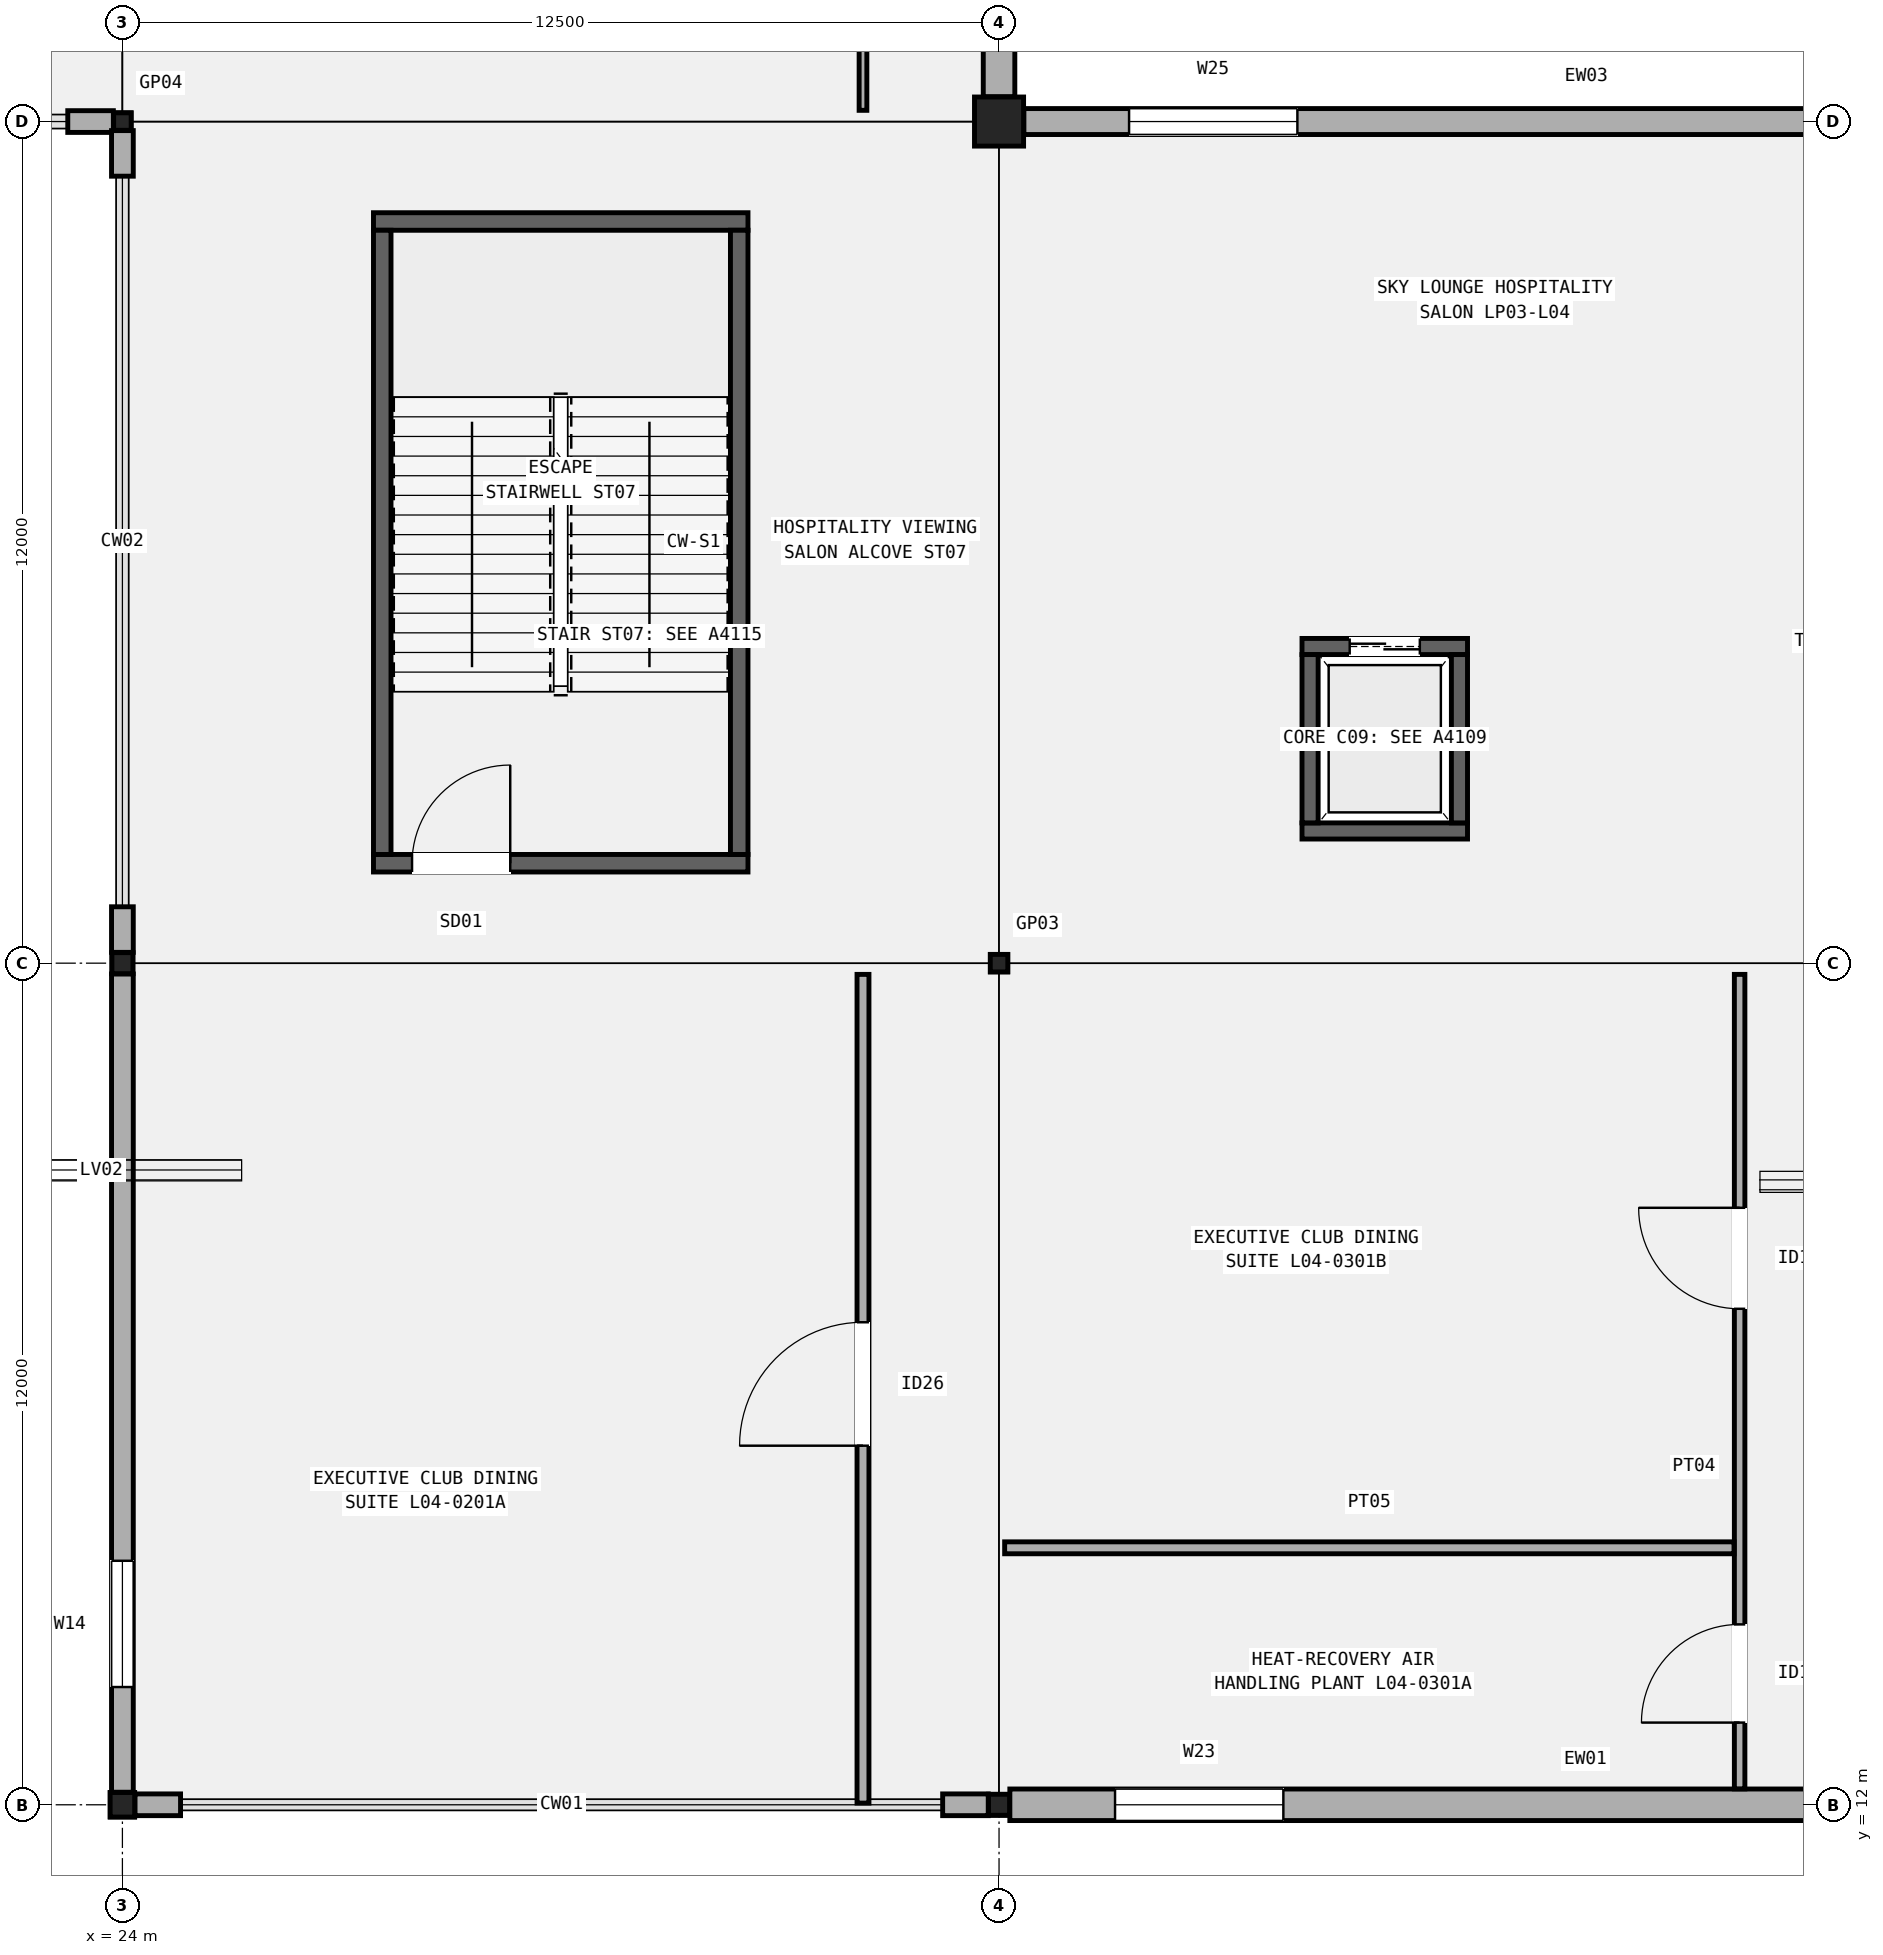
"""IFC4 building model, lengths in metres.
Left out: names, types, materials, properties, quantities, classifications, styles, units other than length and angle.
Written with IfcOpenShell. Run it as: python <this file> out.ifc"""

import sys

from ifc_helpers import new_model, si_unit, direction, frame, frame_2d, origin, origin_2d, place, context, subcontext, project, spatial, rectangle, hollow_rectangle, extrude, element, fill, save


model = new_model("IFC4")
c1 = context("Model", 3, precision=1e-05, world=origin(), true_north=direction((0.0, 1.0)))
c2 = subcontext(c1, "Body", "Model", "MODEL_VIEW")
j1 = project(units=[si_unit("LENGTHUNIT", "METRE"), si_unit("PLANEANGLEUNIT", "RADIAN")], contexts=[c1])
p1 = place(None, origin())
s1 = spatial("IfcSite", under=j1, at=p1, CompositionType="ELEMENT")
p2 = place(p1, origin())
s2 = spatial("IfcBuilding", under=s1, at=p2, CompositionType="ELEMENT")
p3 = place(p2, frame((0.0, 0.0, 20.4)))
s3 = spatial("IfcBuildingStorey", under=s2, at=p3, CompositionType="ELEMENT", Elevation=20.4)
p4 = place(p3, frame((24.0, 12.0, 0.0), z_axis=(0.0, 0.0, 1.0), x_axis=(1.0, 0.0, 0.0)))
e1 = element("IfcColumn", 1, at=p4, inside=s3, PredefinedType="COLUMN", context=c2, shape_type="SweptSolid", body=[
    extrude(hollow_rectangle(XDim=0.35, YDim=0.35, WallThickness=0.016, InnerFilletRadius=0.016, OuterFilletRadius=0.032, at=origin_2d()), origin(), (0.0, 0.0, 1.0), 5.4),
])
p5 = place(p3, frame((24.0, 24.0, 0.0), z_axis=(0.0, 0.0, 1.0), x_axis=(1.0, 0.0, 0.0)))
e2 = element("IfcColumn", 2, at=p5, inside=s3, PredefinedType="COLUMN", context=c2, shape_type="SweptSolid", body=[
    extrude(hollow_rectangle(XDim=0.3, YDim=0.3, WallThickness=0.012, InnerFilletRadius=0.012, OuterFilletRadius=0.024, at=origin_2d()), origin(), (0.0, 0.0, 1.0), 5.4),
])
p6 = place(p3, frame((24.0, 36.0, 0.0), z_axis=(0.0, 0.0, 1.0), x_axis=(1.0, 0.0, 0.0)))
e3 = element("IfcColumn", 3, at=p6, inside=s3, PredefinedType="COLUMN", context=c2, shape_type="SweptSolid", body=[
    extrude(hollow_rectangle(XDim=0.25, YDim=0.25, WallThickness=0.012, InnerFilletRadius=0.012, OuterFilletRadius=0.024, at=origin_2d()), origin(), (0.0, 0.0, 1.0), 5.4),
])
p7 = place(p3, frame((36.5, 12.0, 0.0), z_axis=(0.0, 0.0, 1.0), x_axis=(1.0, 0.0, 0.0)))
e4 = element("IfcColumn", 4, at=p7, inside=s3, PredefinedType="COLUMN", context=c2, shape_type="SweptSolid", body=[
    extrude(hollow_rectangle(XDim=0.3, YDim=0.3, WallThickness=0.012, InnerFilletRadius=0.012, OuterFilletRadius=0.024, at=origin_2d()), origin(), (0.0, 0.0, 1.0), 5.4),
])
p8 = place(p3, frame((36.5, 24.0, 0.0), z_axis=(0.0, 0.0, 1.0), x_axis=(1.0, 0.0, 0.0)))
e5 = element("IfcColumn", 5, at=p8, inside=s3, PredefinedType="COLUMN", context=c2, shape_type="SweptSolid", body=[
    extrude(hollow_rectangle(XDim=0.25, YDim=0.25, WallThickness=0.012, InnerFilletRadius=0.012, OuterFilletRadius=0.024, at=origin_2d()), origin(), (0.0, 0.0, 1.0), 5.4),
])
p9 = place(p3, frame((36.5, 36.0, 0.0), z_axis=(0.0, 0.0, 1.0), x_axis=(1.0, 0.0, 0.0)))
e6 = element("IfcColumn", 6, at=p9, inside=s3, PredefinedType="COLUMN", context=c2, shape_type="SweptSolid", body=[
    extrude(rectangle(XDim=0.7, YDim=0.7, at=origin_2d()), origin(), (0.0, 0.0, 1.0), 5.4),
])
p10 = place(p3, frame((23.221, 36.0, 0.0), z_axis=(0.0, 0.0, 1.0), x_axis=(1.0, 0.0, 0.0)))
e7 = element("IfcWall", 7, at=p10, inside=s3, PredefinedType="SOLIDWALL", context=c2, shape_type="SweptSolid", body=[
    extrude(rectangle(XDim=0.65, YDim=0.31, at=frame_2d((0.325, 0.0))), origin(), (0.0, 0.0, 1.0), 4.58),
])
p11 = place(p3, frame((24.179, 12.0, 0.0), z_axis=(0.0, 0.0, 1.0), x_axis=(1.0, 0.0, 0.0)))
e8 = element("IfcWall", 8, at=p11, inside=s3, PredefinedType="SOLIDWALL", context=c2, shape_type="SweptSolid", body=[
    extrude(rectangle(XDim=0.65, YDim=0.31, at=frame_2d((0.325, 0.0))), origin(), (0.0, 0.0, 1.0), 4.48),
])
p12 = place(p3, frame((35.696, 12.0, 0.0), z_axis=(0.0, 0.0, 1.0), x_axis=(1.0, 0.0, 0.0)))
e9 = element("IfcWall", 9, at=p12, inside=s3, PredefinedType="SOLIDWALL", context=c2, shape_type="SweptSolid", body=[
    extrude(rectangle(XDim=0.65, YDim=0.31, at=frame_2d((0.325, 0.0))), origin(), (0.0, 0.0, 1.0), 4.48),
])
p13 = place(p3, frame((24.0, 12.179, 0.0), z_axis=(0.0, 0.0, 1.0), x_axis=(0.0, 1.0, 0.0)))
e10 = element("IfcWall", 10, at=p13, inside=s3, PredefinedType="SOLIDWALL", context=c2, shape_type="SweptSolid", body=[
    extrude(rectangle(XDim=11.667, YDim=0.31, at=frame_2d((5.833, 0.0))), origin(), (0.0, 0.0, 1.0), 4.48),
])
p14 = place(p13, frame((1.5, 0.0, 0.95)))
e11 = element("IfcOpeningElement", 11, at=p14, cuts=e10, PredefinedType="OPENING", context=c2, shape_type="SweptSolid", body=[
    extrude(rectangle(XDim=1.8, YDim=2.15, at=frame_2d((0.9, 1.075))), frame((0.0, 0.165, 0.0), z_axis=(0.0, -1.0, 0.0), x_axis=(1.0, 0.0, 0.0)), (0.0, 0.0, 1.0), 0.33),
])
p15 = place(p3, frame((24.0, 24.154, 0.0), z_axis=(0.0, 0.0, 1.0), x_axis=(0.0, 1.0, 0.0)))
e12 = element("IfcWall", 12, at=p15, inside=s3, PredefinedType="SOLIDWALL", context=c2, shape_type="SweptSolid", body=[
    extrude(rectangle(XDim=0.65, YDim=0.31, at=frame_2d((0.325, 0.0))), origin(), (0.0, 0.0, 1.0), 4.58),
])
p16 = place(p3, frame((24.0, 35.221, 0.0), z_axis=(0.0, 0.0, 1.0), x_axis=(0.0, 1.0, 0.0)))
e13 = element("IfcWall", 13, at=p16, inside=s3, PredefinedType="SOLIDWALL", context=c2, shape_type="SweptSolid", body=[
    extrude(rectangle(XDim=0.65, YDim=0.31, at=frame_2d((0.325, 0.0))), origin(), (0.0, 0.0, 1.0), 4.58),
])
p17 = place(p3, frame((36.5, 36.354, 0.0), z_axis=(0.0, 0.0, 1.0), x_axis=(0.0, 1.0, 0.0)))
e14 = element("IfcWall", 14, at=p17, inside=s3, PredefinedType="SOLIDWALL", context=c2, shape_type="SweptSolid", body=[
    extrude(rectangle(XDim=11.342, YDim=0.45, at=frame_2d((5.671, 0.0))), origin(), (0.0, 0.0, 1.0), 4.48),
])
p18 = place(p17, frame((1.5, 0.0, 0.95)))
e15 = element("IfcOpeningElement", 15, at=p18, cuts=e14, PredefinedType="OPENING", context=c2, shape_type="SweptSolid", body=[
    extrude(rectangle(XDim=1.8, YDim=2.55, at=frame_2d((0.9, 1.275))), frame((0.0, 0.235, 0.0), z_axis=(0.0, -1.0, 0.0), x_axis=(1.0, 0.0, 0.0)), (0.0, 0.0, 1.0), 0.47),
])
p19 = place(p3, frame((36.654, 12.0, 0.0), z_axis=(0.0, 0.0, 1.0), x_axis=(1.0, 0.0, 0.0)))
e16 = element("IfcWall", 16, at=p19, inside=s3, PredefinedType="SOLIDWALL", context=c2, shape_type="SweptSolid", body=[
    extrude(rectangle(XDim=12.217, YDim=0.45, at=frame_2d((6.108, 0.0))), origin(), (0.0, 0.0, 1.0), 4.58),
])
p20 = place(p19, frame((1.5, 0.0, 0.95)))
e17 = element("IfcOpeningElement", 17, at=p20, cuts=e16, PredefinedType="OPENING", context=c2, shape_type="SweptSolid", body=[
    extrude(rectangle(XDim=2.4, YDim=1.65, at=frame_2d((1.2, 0.825))), frame((0.0, 0.235, 0.0), z_axis=(0.0, -1.0, 0.0), x_axis=(1.0, 0.0, 0.0)), (0.0, 0.0, 1.0), 0.47),
])
p21 = place(p3, frame((36.854, 36.0, 0.0), z_axis=(0.0, 0.0, 1.0), x_axis=(1.0, 0.0, 0.0)))
e18 = element("IfcWall", 18, at=p21, inside=s3, PredefinedType="SOLIDWALL", context=c2, shape_type="SweptSolid", body=[
    extrude(rectangle(XDim=11.842, YDim=0.37, at=frame_2d((5.921, 0.0))), origin(), (0.0, 0.0, 1.0), 4.48),
])
p22 = place(p21, frame((1.5, 0.0, 0.95)))
e19 = element("IfcOpeningElement", 19, at=p22, cuts=e18, PredefinedType="OPENING", context=c2, shape_type="SweptSolid", body=[
    extrude(rectangle(XDim=2.4, YDim=2.45, at=frame_2d((1.2, 1.225))), frame((0.0, 0.195, 0.0), z_axis=(0.0, -1.0, 0.0), x_axis=(1.0, 0.0, 0.0)), (0.0, 0.0, 1.0), 0.39),
])
p23 = place(p3, frame((27.58, 25.425, 0.0), z_axis=(0.0, 0.0, 1.0), x_axis=(1.0, 0.0, 0.0)))
e20 = element("IfcWall", 20, at=p23, inside=s3, PredefinedType="SHEAR", context=c2, shape_type="SweptSolid", body=[
    extrude(rectangle(XDim=5.34, YDim=0.25, at=frame_2d((2.67, 0.0))), origin(), (0.0, 0.0, 1.0), 5.18),
])
p24 = place(p23, frame((0.55, 0.0, 0.0)))
e21 = element("IfcOpeningElement", 21, at=p24, cuts=e20, PredefinedType="OPENING", context=c2, shape_type="SweptSolid", body=[
    extrude(rectangle(XDim=1.4, YDim=2.15, at=frame_2d((0.7, 1.075))), frame((0.0, 0.135, 0.0), z_axis=(0.0, -1.0, 0.0), x_axis=(1.0, 0.0, 0.0)), (0.0, 0.0, 1.0), 0.27),
])
p25 = place(p3, frame((27.58, 34.575, 0.0), z_axis=(0.0, 0.0, 1.0), x_axis=(1.0, 0.0, 0.0)))
e22 = element("IfcWall", 22, at=p25, inside=s3, PredefinedType="SHEAR", context=c2, shape_type="SweptSolid", body=[
    extrude(rectangle(XDim=5.34, YDim=0.25, at=frame_2d((2.67, 0.0))), origin(), (0.0, 0.0, 1.0), 5.18),
])
for number, where, z_axis, x_axis in (
    (23, (27.705, 25.55, 0.0), (0.0, 0.0, 1.0), (0.0, 1.0, 0.0)),
    (24, (32.795, 25.55, 0.0), (0.0, 0.0, 1.0), (0.0, 1.0, 0.0)),
):
    element("IfcWall", number, at=place(p3, frame(where, z_axis=z_axis, x_axis=x_axis)), inside=s3, PredefinedType="SHEAR", context=c2, shape_type="SweptSolid", body=[
        extrude(rectangle(XDim=8.9, YDim=0.25, at=frame_2d((4.45, 0.0))), origin(), (0.0, 0.0, 1.0), 5.18),
    ])
p26 = place(p3, frame((40.82, 25.885, 0.0), z_axis=(0.0, 0.0, 1.0), x_axis=(1.0, 0.0, 0.0)))
e25 = element("IfcWall", 25, at=p26, inside=s3, PredefinedType="SHEAR", context=c2, shape_type="SweptSolid", body=[
    extrude(rectangle(XDim=2.36, YDim=0.23, at=frame_2d((1.18, 0.0))), origin(), (0.0, 0.0, 1.0), 5.18),
])
p27 = place(p3, frame((40.82, 28.515, 0.0), z_axis=(0.0, 0.0, 1.0), x_axis=(1.0, 0.0, 0.0)))
e26 = element("IfcWall", 26, at=p27, inside=s3, PredefinedType="SHEAR", context=c2, shape_type="SweptSolid", body=[
    extrude(rectangle(XDim=2.36, YDim=0.23, at=frame_2d((1.18, 0.0))), origin(), (0.0, 0.0, 1.0), 5.18),
])
p28 = place(p27, frame((0.68, 0.0, 0.0)))
e27 = element("IfcOpeningElement", 27, at=p28, cuts=e26, PredefinedType="OPENING", context=c2, shape_type="SweptSolid", body=[
    extrude(rectangle(XDim=1.0, YDim=2.15, at=frame_2d((0.5, 1.075))), frame((0.0, 0.125, 0.0), z_axis=(0.0, -1.0, 0.0), x_axis=(1.0, 0.0, 0.0)), (0.0, 0.0, 1.0), 0.25),
])
for number, where, z_axis, x_axis in (
    (28, (40.935, 26.0, 0.0), (0.0, 0.0, 1.0), (0.0, 1.0, 0.0)),
    (29, (43.065, 26.0, 0.0), (0.0, 0.0, 1.0), (0.0, 1.0, 0.0)),
):
    element("IfcWall", number, at=place(p3, frame(where, z_axis=z_axis, x_axis=x_axis)), inside=s3, PredefinedType="SHEAR", context=c2, shape_type="SweptSolid", body=[
        extrude(rectangle(XDim=2.4, YDim=0.23, at=frame_2d((1.2, 0.0))), origin(), (0.0, 0.0, 1.0), 5.18),
    ])
p29 = place(p3, frame((34.56, 12.024, 0.0), z_axis=(0.0, 0.0, 1.0), x_axis=(0.0, 1.0, 0.0)))
e30 = element("IfcWall", 30, at=p29, inside=s3, PredefinedType="PARTITIONING", context=c2, shape_type="SweptSolid", body=[
    extrude(rectangle(XDim=11.816, YDim=0.17, at=frame_2d((5.908, 0.0))), origin(), (0.0, 0.0, 1.0), 4.52),
])
p30 = place(p29, frame((5.096, 0.0, 0.0)))
e31 = element("IfcOpeningElement", 31, at=p30, cuts=e30, PredefinedType="OPENING", context=c2, shape_type="SweptSolid", body=[
    extrude(rectangle(XDim=1.76, YDim=2.3, at=frame_2d((0.88, 1.15))), frame((0.0, 0.095, 0.0), z_axis=(0.0, -1.0, 0.0), x_axis=(1.0, 0.0, 0.0)), (0.0, 0.0, 1.0), 0.19),
])
p31 = place(p3, frame((34.56, 36.16, 0.0), z_axis=(0.0, 0.0, 1.0), x_axis=(0.0, 1.0, 0.0)))
e32 = element("IfcWall", 32, at=p31, inside=s3, PredefinedType="PARTITIONING", context=c2, shape_type="SweptSolid", body=[
    extrude(rectangle(XDim=11.68, YDim=0.11, at=frame_2d((5.84, 0.0))), origin(), (0.0, 0.0, 1.0), 4.52),
])
p32 = place(p31, frame((2.488, 0.0, 0.0)))
e33 = element("IfcOpeningElement", 33, at=p32, cuts=e32, PredefinedType="OPENING", context=c2, shape_type="SweptSolid", body=[
    extrude(rectangle(XDim=0.9, YDim=2.06, at=frame_2d((0.45, 1.03))), frame((0.0, 0.065, 0.0), z_axis=(0.0, -1.0, 0.0), x_axis=(1.0, 0.0, 0.0)), (0.0, 0.0, 1.0), 0.13),
])
p33 = place(p31, frame((8.398, 0.0, 0.0)))
e34 = element("IfcOpeningElement", 34, at=p33, cuts=e32, PredefinedType="OPENING", context=c2, shape_type="SweptSolid", body=[
    extrude(rectangle(XDim=0.92, YDim=2.1, at=frame_2d((0.46, 1.05))), frame((0.0, 0.065, 0.0), z_axis=(0.0, -1.0, 0.0), x_axis=(1.0, 0.0, 0.0)), (0.0, 0.0, 1.0), 0.13),
])
p34 = place(p3, frame((47.06, 12.227, 0.0), z_axis=(0.0, 0.0, 1.0), x_axis=(0.0, 1.0, 0.0)))
e35 = element("IfcWall", 35, at=p34, inside=s3, PredefinedType="PARTITIONING", context=c2, shape_type="SweptSolid", body=[
    extrude(rectangle(XDim=11.613, YDim=0.15, at=frame_2d((5.807, 0.0))), origin(), (0.0, 0.0, 1.0), 4.52),
])
p35 = place(p34, frame((0.945, 0.0, 0.0)))
e36 = element("IfcOpeningElement", 36, at=p35, cuts=e35, PredefinedType="OPENING", context=c2, shape_type="SweptSolid", body=[
    extrude(rectangle(XDim=1.4, YDim=2.24, at=frame_2d((0.7, 1.12))), frame((0.0, 0.085, 0.0), z_axis=(0.0, -1.0, 0.0), x_axis=(1.0, 0.0, 0.0)), (0.0, 0.0, 1.0), 0.17),
])
p36 = place(p34, frame((6.845, 0.0, 0.0)))
e37 = element("IfcOpeningElement", 37, at=p36, cuts=e35, PredefinedType="OPENING", context=c2, shape_type="SweptSolid", body=[
    extrude(rectangle(XDim=1.44, YDim=2.26, at=frame_2d((0.72, 1.13))), frame((0.0, 0.085, 0.0), z_axis=(0.0, -1.0, 0.0), x_axis=(1.0, 0.0, 0.0)), (0.0, 0.0, 1.0), 0.17),
])
p37 = place(p3, frame((36.58, 15.664, 0.0), z_axis=(0.0, 0.0, 1.0), x_axis=(1.0, 0.0, 0.0)))
e38 = element("IfcWall", 38, at=p37, inside=s3, PredefinedType="PARTITIONING", context=c2, shape_type="SweptSolid", body=[
    extrude(rectangle(XDim=10.4, YDim=0.17, at=frame_2d((5.2, 0.0))), origin(), (0.0, 0.0, 1.0), 4.52),
])
p38 = place(p14, origin())
e39 = element("IfcWindow", 39, at=p38, inside=s3, PartitioningType="SINGLE_PANEL", PredefinedType="WINDOW", context=c2, shape_type="SweptSolid", body=[
    extrude(rectangle(XDim=1.8, YDim=2.15, at=frame_2d((0.9, 1.075))), frame((0.0, 0.03, 0.0), z_axis=(0.0, -1.0, 0.0), x_axis=(1.0, 0.0, 0.0)), (0.0, 0.0, 1.0), 0.06),
])
fill(e11, e39)
p39 = place(p20, origin())
e40 = element("IfcWindow", 40, at=p39, inside=s3, PartitioningType="SINGLE_PANEL", PredefinedType="WINDOW", context=c2, shape_type="SweptSolid", body=[
    extrude(rectangle(XDim=2.4, YDim=1.65, at=frame_2d((1.2, 0.825))), frame((0.0, 0.03, 0.0), z_axis=(0.0, -1.0, 0.0), x_axis=(1.0, 0.0, 0.0)), (0.0, 0.0, 1.0), 0.06),
])
fill(e17, e40)
p40 = place(p22, origin())
e41 = element("IfcWindow", 41, at=p40, inside=s3, PartitioningType="SINGLE_PANEL", PredefinedType="WINDOW", context=c2, shape_type="SweptSolid", body=[
    extrude(rectangle(XDim=2.4, YDim=2.45, at=frame_2d((1.2, 1.225))), frame((0.0, 0.03, 0.0), z_axis=(0.0, -1.0, 0.0), x_axis=(1.0, 0.0, 0.0)), (0.0, 0.0, 1.0), 0.06),
])
fill(e19, e41)
p41 = place(p24, origin())
e42 = element("IfcDoor", 42, at=p41, inside=s3, OperationType="SINGLE_SWING_RIGHT", PredefinedType="DOOR", context=c2, shape_type="SweptSolid", body=[
    extrude(rectangle(XDim=1.4, YDim=2.15, at=frame_2d((0.7, 1.075))), frame((0.0, 0.025, 0.0), z_axis=(0.0, -1.0, 0.0), x_axis=(1.0, 0.0, 0.0)), (0.0, 0.0, 1.0), 0.05),
])
fill(e21, e42)
p42 = place(p28, origin())
e43 = element("IfcDoor", 43, at=p42, inside=s3, OperationType="DOUBLE_DOOR_SLIDING", PredefinedType="DOOR", context=c2, shape_type="SweptSolid", body=[
    extrude(rectangle(XDim=1.0, YDim=2.15, at=frame_2d((0.5, 1.075))), frame((0.0, 0.025, 0.0), z_axis=(0.0, -1.0, 0.0), x_axis=(1.0, 0.0, 0.0)), (0.0, 0.0, 1.0), 0.05),
])
fill(e27, e43)
p43 = place(p30, origin())
e44 = element("IfcDoor", 44, at=p43, inside=s3, OperationType="SINGLE_SWING_LEFT", PredefinedType="DOOR", context=c2, shape_type="SweptSolid", body=[
    extrude(rectangle(XDim=1.76, YDim=2.3, at=frame_2d((0.88, 1.15))), frame((0.0, 0.025, 0.0), z_axis=(0.0, -1.0, 0.0), x_axis=(1.0, 0.0, 0.0)), (0.0, 0.0, 1.0), 0.05),
])
fill(e31, e44)
p44 = place(p35, origin())
e45 = element("IfcDoor", 45, at=p44, inside=s3, OperationType="SINGLE_SWING_LEFT", PredefinedType="DOOR", context=c2, shape_type="SweptSolid", body=[
    extrude(rectangle(XDim=1.4, YDim=2.24, at=frame_2d((0.7, 1.12))), frame((0.0, 0.025, 0.0), z_axis=(0.0, -1.0, 0.0), x_axis=(1.0, 0.0, 0.0)), (0.0, 0.0, 1.0), 0.05),
])
fill(e36, e45)
p45 = place(p36, origin())
e46 = element("IfcDoor", 46, at=p45, inside=s3, OperationType="SINGLE_SWING_RIGHT", PredefinedType="DOOR", context=c2, shape_type="SweptSolid", body=[
    extrude(rectangle(XDim=1.44, YDim=2.26, at=frame_2d((0.72, 1.13))), frame((0.0, 0.025, 0.0), z_axis=(0.0, -1.0, 0.0), x_axis=(1.0, 0.0, 0.0)), (0.0, 0.0, 1.0), 0.05),
])
fill(e37, e46)
save(model, sys.argv[1])
